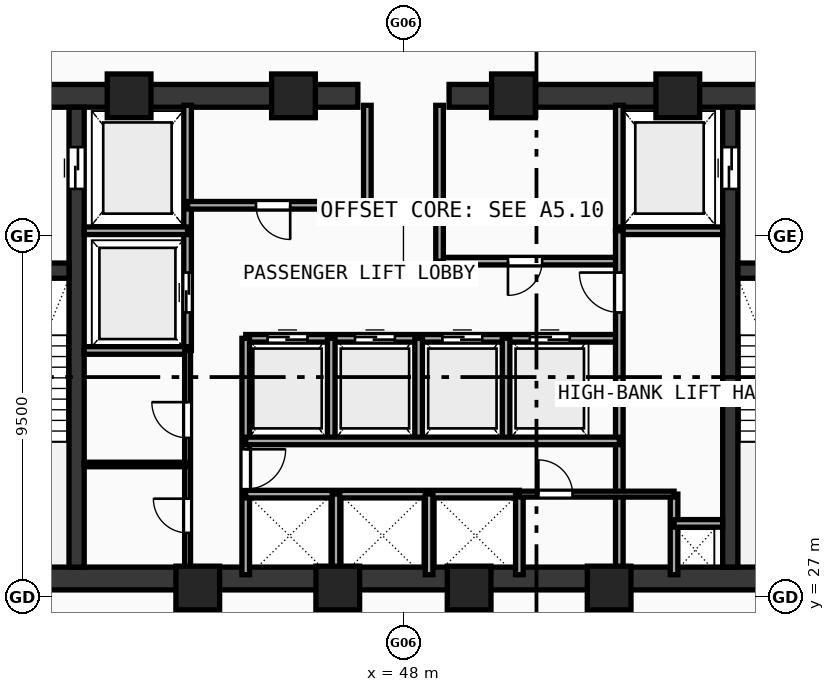
"""IFC4 building model, lengths in metres.
Left out: names, types, materials, properties, quantities, classifications, styles, units other than length and angle.
Written with IfcOpenShell. Run it as: python <this file> out.ifc"""

import sys

from ifc_helpers import new_model, si_unit, direction, frame, frame_2d, origin, origin_with_axes, origin_2d, place, context, subcontext, project, spatial, rectangle, hollow_rectangle, extrude, source, transform, mapped, element, fill, save


model = new_model("IFC4")
c1 = context("Model", 3, precision=1e-05, world=origin(), true_north=direction((0.0, 1.0)))
c2 = subcontext(c1, "Body", "Model", "MODEL_VIEW")
j1 = project(units=[si_unit("LENGTHUNIT", "METRE"), si_unit("PLANEANGLEUNIT", "RADIAN")], contexts=[c1])
p1 = place(None, origin())
s1 = spatial("IfcSite", under=j1, at=p1, CompositionType="ELEMENT")
p2 = place(p1, origin())
s2 = spatial("IfcBuilding", under=s1, at=p2, CompositionType="ELEMENT")
p3 = place(p2, frame((0.0, 0.0, 133.51)))
s3 = spatial("IfcBuildingStorey", under=s2, at=p3, CompositionType="ELEMENT", Elevation=133.51)
p4 = place(p3, frame((35.5, 27.5, 0.0), z_axis=(0.0, 0.0, 1.0), x_axis=(1.0, 0.0, 0.0)))
e1 = element("IfcWall", 1, at=p4, inside=s3, PredefinedType="SHEAR", context=c2, shape_type="SweptSolid", body=[
    extrude(rectangle(XDim=25.0, YDim=0.6, at=frame_2d((12.5, 0.0))), origin(), (0.0, 0.0, 1.0), 3.42),
])
p5 = place(p3, frame((35.5, 40.2, 0.0), z_axis=(0.0, 0.0, 1.0), x_axis=(1.0, 0.0, 0.0)))
e2 = element("IfcWall", 2, at=p5, inside=s3, PredefinedType="SHEAR", context=c2, shape_type="SweptSolid", body=[
    extrude(rectangle(XDim=11.3, YDim=0.6, at=frame_2d((5.65, 0.0))), origin(), (0.0, 0.0, 1.0), 3.42),
])
p6 = place(p5, frame((1.65, 0.0, 0.0)))
e3 = element("IfcOpeningElement", 3, at=p6, cuts=e2, PredefinedType="OPENING", context=c2, shape_type="SweptSolid", body=[
    extrude(rectangle(XDim=1.05, YDim=2.1, at=frame_2d((0.525, 1.05))), frame((0.0, 0.31, 0.0), z_axis=(0.0, -1.0, 0.0), x_axis=(1.0, 0.0, 0.0)), (0.0, 0.0, 1.0), 0.62),
])
p7 = place(p3, frame((49.2, 40.2, 0.0), z_axis=(0.0, 0.0, 1.0), x_axis=(1.0, 0.0, 0.0)))
e4 = element("IfcWall", 4, at=p7, inside=s3, PredefinedType="SHEAR", context=c2, shape_type="SweptSolid", body=[
    extrude(rectangle(XDim=11.3, YDim=0.6, at=frame_2d((5.65, 0.0))), origin(), (0.0, 0.0, 1.0), 3.42),
])
p8 = place(p7, frame((8.6, 0.0, 0.0)))
e5 = element("IfcOpeningElement", 5, at=p8, cuts=e4, PredefinedType="OPENING", context=c2, shape_type="SweptSolid", body=[
    extrude(rectangle(XDim=1.05, YDim=2.1, at=frame_2d((0.525, 1.05))), frame((0.0, 0.31, 0.0), z_axis=(0.0, -1.0, 0.0), x_axis=(1.0, 0.0, 0.0)), (0.0, 0.0, 1.0), 0.62),
])
p9 = place(p3, frame((39.4, 27.8, 0.0), z_axis=(0.0, 0.0, 1.0), x_axis=(0.0, 1.0, 0.0)))
e6 = element("IfcWall", 6, at=p9, inside=s3, PredefinedType="SHEAR", context=c2, shape_type="SweptSolid", body=[
    extrude(rectangle(XDim=12.1, YDim=0.4, at=frame_2d((6.05, 0.0))), origin(), (0.0, 0.0, 1.0), 3.42),
])
p10 = place(p9, frame((9.95, 0.0, 0.0)))
e7 = element("IfcOpeningElement", 7, at=p10, cuts=e6, PredefinedType="OPENING", context=c2, shape_type="SweptSolid", body=[
    extrude(rectangle(XDim=1.1, YDim=2.1, at=frame_2d((0.55, 1.05))), frame((0.0, 0.21, 0.0), z_axis=(0.0, -1.0, 0.0), x_axis=(1.0, 0.0, 0.0)), (0.0, 0.0, 1.0), 0.42),
])
p11 = place(p3, frame((56.6, 27.8, 0.0), z_axis=(0.0, 0.0, 1.0), x_axis=(0.0, 1.0, 0.0)))
e8 = element("IfcWall", 8, at=p11, inside=s3, PredefinedType="SHEAR", context=c2, shape_type="SweptSolid", body=[
    extrude(rectangle(XDim=12.1, YDim=0.4, at=frame_2d((6.05, 0.0))), origin(), (0.0, 0.0, 1.0), 3.42),
])
p12 = place(p11, frame((9.95, 0.0, 0.0)))
e9 = element("IfcOpeningElement", 9, at=p12, cuts=e8, PredefinedType="OPENING", context=c2, shape_type="SweptSolid", body=[
    extrude(rectangle(XDim=1.1, YDim=2.1, at=frame_2d((0.55, 1.05))), frame((0.0, 0.21, 0.0), z_axis=(0.0, -1.0, 0.0), x_axis=(1.0, 0.0, 0.0)), (0.0, 0.0, 1.0), 0.42),
])
p13 = place(p3, frame((36.1, 35.6, 0.0), z_axis=(0.0, 0.0, 1.0), x_axis=(1.0, 0.0, 0.0)))
e10 = element("IfcWall", 10, at=p13, inside=s3, PredefinedType="SHEAR", context=c2, shape_type="SweptSolid", body=[
    extrude(rectangle(XDim=3.1, YDim=0.4, at=frame_2d((1.55, 0.0))), origin(), (0.0, 0.0, 1.0), 3.42),
])
p14 = place(p13, frame((1.02, 0.0, 0.0)))
e11 = element("IfcOpeningElement", 11, at=p14, cuts=e10, PredefinedType="OPENING", context=c2, shape_type="SweptSolid", body=[
    extrude(rectangle(XDim=1.05, YDim=2.1, at=frame_2d((0.525, 1.05))), frame((0.0, 0.21, 0.0), z_axis=(0.0, -1.0, 0.0), x_axis=(1.0, 0.0, 0.0)), (0.0, 0.0, 1.0), 0.42),
])
p15 = place(p3, frame((56.8, 35.6, 0.0), z_axis=(0.0, 0.0, 1.0), x_axis=(1.0, 0.0, 0.0)))
e12 = element("IfcWall", 12, at=p15, inside=s3, PredefinedType="SHEAR", context=c2, shape_type="SweptSolid", body=[
    extrude(rectangle(XDim=3.1, YDim=0.4, at=frame_2d((1.55, 0.0))), origin(), (0.0, 0.0, 1.0), 3.42),
])
p16 = place(p15, frame((1.02, 0.0, 0.0)))
e13 = element("IfcOpeningElement", 13, at=p16, cuts=e12, PredefinedType="OPENING", context=c2, shape_type="SweptSolid", body=[
    extrude(rectangle(XDim=1.05, YDim=2.1, at=frame_2d((0.525, 1.05))), frame((0.0, 0.21, 0.0), z_axis=(0.0, -1.0, 0.0), x_axis=(1.0, 0.0, 0.0)), (0.0, 0.0, 1.0), 0.42),
])
m1 = source(origin(), c2, "Body", "SweptSolid", [
    extrude(hollow_rectangle(XDim=1.15, YDim=1.15, WallThickness=0.048, at=origin_2d()), origin(), (0.0, 0.0, 1.0), 3.68),
])
for number, where, z_axis, x_axis in (
    (14, (42.588, 27.25, -0.26), (0.0, 0.0, 1.0), (1.0, 0.0, 0.0)),
    (15, (46.272, 27.25, -0.26), (0.0, 0.0, 1.0), (1.0, 0.0, 0.0)),
    (16, (49.729, 27.25, -0.26), (0.0, 0.0, 1.0), (1.0, 0.0, 0.0)),
    (17, (53.412, 27.25, -0.26), (0.0, 0.0, 1.0), (1.0, 0.0, 0.0)),
    (18, (55.219, 40.2, -0.26), (0.0, 0.0, 1.0), (1.0, 0.0, 0.0)),
    (19, (50.894, 40.2, -0.26), (0.0, 0.0, 1.0), (1.0, 0.0, 0.0)),
    (20, (45.106, 40.2, -0.26), (0.0, 0.0, 1.0), (1.0, 0.0, 0.0)),
    (21, (40.781, 40.2, -0.26), (0.0, 0.0, 1.0), (1.0, 0.0, 0.0)),
):
    element("IfcColumn", number, at=place(p3, frame(where, z_axis=z_axis, x_axis=x_axis)), inside=s3, PredefinedType="COLUMN", context=c2, shape_type="MappedRepresentation", body=[
        mapped(m1, transform((0.0, 0.0, 0.0), scale=1.0)),
    ])
p17 = place(p3, frame((42.32, 33.5, 0.0), z_axis=(0.0, 0.0, 1.0), x_axis=(0.0, 1.0, 0.0)))
e22 = element("IfcWall", 22, at=p17, inside=s3, PredefinedType="SOLIDWALL", context=c2, shape_type="SweptSolid", body=[
    extrude(rectangle(XDim=6.45, YDim=0.2, at=frame_2d((3.225, 0.0))), origin(), (0.0, 0.0, 1.0), 3.42),
])
p18 = place(p17, frame((1.0, 0.0, 0.0)))
e23 = element("IfcOpeningElement", 23, at=p18, cuts=e22, PredefinedType="OPENING", context=c2, shape_type="SweptSolid", body=[
    extrude(rectangle(XDim=1.05, YDim=2.1, at=frame_2d((0.525, 1.05))), frame((0.0, 0.11, 0.0), z_axis=(0.0, -1.0, 0.0), x_axis=(1.0, 0.0, 0.0)), (0.0, 0.0, 1.0), 0.22),
])
for number, where, z_axis, x_axis in (
    (24, (39.6, 36.65, 0.0), (0.0, 0.0, 1.0), (1.0, 0.0, 0.0)),
    (25, (39.6, 33.5, 0.0), (0.0, 0.0, 1.0), (1.0, 0.0, 0.0)),
):
    element("IfcWall", number, at=place(p3, frame(where, z_axis=z_axis, x_axis=x_axis)), inside=s3, PredefinedType="SOLIDWALL", context=c2, shape_type="SweptSolid", body=[
        extrude(rectangle(XDim=2.72, YDim=0.2, at=frame_2d((1.36, 0.0))), origin(), (0.0, 0.0, 1.0), 3.42),
    ])
p19 = place(p3, frame((53.68, 36.65, 0.0), z_axis=(0.0, 0.0, 1.0), x_axis=(0.0, 1.0, 0.0)))
e26 = element("IfcWall", 26, at=p19, inside=s3, PredefinedType="SOLIDWALL", context=c2, shape_type="SweptSolid", body=[
    extrude(rectangle(XDim=3.3, YDim=0.2, at=frame_2d((1.65, 0.0))), origin(), (0.0, 0.0, 1.0), 3.42),
])
p20 = place(p3, frame((53.68, 36.65, 0.0), z_axis=(0.0, 0.0, 1.0), x_axis=(1.0, 0.0, 0.0)))
e27 = element("IfcWall", 27, at=p20, inside=s3, PredefinedType="SOLIDWALL", context=c2, shape_type="SweptSolid", body=[
    extrude(rectangle(XDim=2.72, YDim=0.2, at=frame_2d((1.36, 0.0))), origin(), (0.0, 0.0, 1.0), 3.42),
])
p21 = place(p3, frame((42.32, 37.32, 0.0), z_axis=(0.0, 0.0, 1.0), x_axis=(1.0, 0.0, 0.0)))
e28 = element("IfcWall", 28, at=p21, inside=s3, PredefinedType="SOLIDWALL", context=c2, shape_type="SweptSolid", body=[
    extrude(rectangle(XDim=4.73, YDim=0.2, at=frame_2d((2.365, 0.0))), origin(), (0.0, 0.0, 1.0), 3.42),
])
p22 = place(p21, frame((1.8, 0.0, 0.0)))
e29 = element("IfcOpeningElement", 29, at=p22, cuts=e28, PredefinedType="OPENING", context=c2, shape_type="SweptSolid", body=[
    extrude(rectangle(XDim=0.9, YDim=2.1, at=frame_2d((0.45, 1.05))), frame((0.0, 0.11, 0.0), z_axis=(0.0, -1.0, 0.0), x_axis=(1.0, 0.0, 0.0)), (0.0, 0.0, 1.0), 0.22),
])
p23 = place(p3, frame((48.95, 35.85, 0.0), z_axis=(0.0, 0.0, 1.0), x_axis=(1.0, 0.0, 0.0)))
e30 = element("IfcWall", 30, at=p23, inside=s3, PredefinedType="SOLIDWALL", context=c2, shape_type="SweptSolid", body=[
    extrude(rectangle(XDim=4.73, YDim=0.2, at=frame_2d((2.365, 0.0))), origin(), (0.0, 0.0, 1.0), 3.42),
])
p24 = place(p23, frame((1.8, 0.0, 0.0)))
e31 = element("IfcOpeningElement", 31, at=p24, cuts=e30, PredefinedType="OPENING", context=c2, shape_type="SweptSolid", body=[
    extrude(rectangle(XDim=0.9, YDim=2.1, at=frame_2d((0.45, 1.05))), frame((0.0, 0.11, 0.0), z_axis=(0.0, -1.0, 0.0), x_axis=(1.0, 0.0, 0.0)), (0.0, 0.0, 1.0), 0.22),
])
p25 = place(p3, frame((47.05, 37.32, 0.0), z_axis=(0.0, 0.0, 1.0), x_axis=(0.0, 1.0, 0.0)))
e32 = element("IfcWall", 32, at=p25, inside=s3, PredefinedType="SOLIDWALL", context=c2, shape_type="SweptSolid", body=[
    extrude(rectangle(XDim=2.63, YDim=0.2, at=frame_2d((1.315, 0.0))), origin(), (0.0, 0.0, 1.0), 3.42),
])
p26 = place(p3, frame((48.95, 35.85, 0.0), z_axis=(0.0, 0.0, 1.0), x_axis=(0.0, 1.0, 0.0)))
e33 = element("IfcWall", 33, at=p26, inside=s3, PredefinedType="SOLIDWALL", context=c2, shape_type="SweptSolid", body=[
    extrude(rectangle(XDim=4.1, YDim=0.2, at=frame_2d((2.05, 0.0))), origin(), (0.0, 0.0, 1.0), 3.42),
])
p27 = place(p3, frame((43.85, 33.82, 0.0), z_axis=(0.0, 0.0, 1.0), x_axis=(1.0, 0.0, 0.0)))
e34 = element("IfcWall", 34, at=p27, inside=s3, PredefinedType="SOLIDWALL", context=c2, shape_type="SweptSolid", body=[
    extrude(rectangle(XDim=9.83, YDim=0.2, at=frame_2d((4.915, 0.0))), origin(), (0.0, 0.0, 1.0), 3.42),
])
p28 = place(p27, frame((0.575, 0.0, 0.0)))
e35 = element("IfcOpeningElement", 35, at=p28, cuts=e34, PredefinedType="OPENING", context=c2, shape_type="SweptSolid", body=[
    extrude(rectangle(XDim=1.05, YDim=2.1, at=frame_2d((0.525, 1.05))), frame((0.0, 0.11, 0.0), z_axis=(0.0, -1.0, 0.0), x_axis=(1.0, 0.0, 0.0)), (0.0, 0.0, 1.0), 0.22),
])
p29 = place(p27, frame((2.875, 0.0, 0.0)))
e36 = element("IfcOpeningElement", 36, at=p29, cuts=e34, PredefinedType="OPENING", context=c2, shape_type="SweptSolid", body=[
    extrude(rectangle(XDim=1.05, YDim=2.1, at=frame_2d((0.525, 1.05))), frame((0.0, 0.11, 0.0), z_axis=(0.0, -1.0, 0.0), x_axis=(1.0, 0.0, 0.0)), (0.0, 0.0, 1.0), 0.22),
])
p30 = place(p27, frame((5.175, 0.0, 0.0)))
e37 = element("IfcOpeningElement", 37, at=p30, cuts=e34, PredefinedType="OPENING", context=c2, shape_type="SweptSolid", body=[
    extrude(rectangle(XDim=1.05, YDim=2.1, at=frame_2d((0.525, 1.05))), frame((0.0, 0.11, 0.0), z_axis=(0.0, -1.0, 0.0), x_axis=(1.0, 0.0, 0.0)), (0.0, 0.0, 1.0), 0.22),
])
p31 = place(p27, frame((7.475, 0.0, 0.0)))
e38 = element("IfcOpeningElement", 38, at=p31, cuts=e34, PredefinedType="OPENING", context=c2, shape_type="SweptSolid", body=[
    extrude(rectangle(XDim=1.05, YDim=2.1, at=frame_2d((0.525, 1.05))), frame((0.0, 0.11, 0.0), z_axis=(0.0, -1.0, 0.0), x_axis=(1.0, 0.0, 0.0)), (0.0, 0.0, 1.0), 0.22),
])
p32 = place(p3, frame((43.85, 27.6, 0.0), z_axis=(0.0, 0.0, 1.0), x_axis=(0.0, 1.0, 0.0)))
e39 = element("IfcWall", 39, at=p32, inside=s3, PredefinedType="SOLIDWALL", context=c2, shape_type="SweptSolid", body=[
    extrude(rectangle(XDim=6.22, YDim=0.2, at=frame_2d((3.11, 0.0))), origin(), (0.0, 0.0, 1.0), 3.42),
])
p33 = place(p32, frame((2.25, 0.0, 0.0)))
e40 = element("IfcOpeningElement", 40, at=p33, cuts=e39, PredefinedType="OPENING", context=c2, shape_type="SweptSolid", body=[
    extrude(rectangle(XDim=1.05, YDim=2.1, at=frame_2d((0.525, 1.05))), frame((0.0, 0.11, 0.0), z_axis=(0.0, -1.0, 0.0), x_axis=(1.0, 0.0, 0.0)), (0.0, 0.0, 1.0), 0.22),
])
p34 = place(p3, frame((53.68, 27.6, 0.0), z_axis=(0.0, 0.0, 1.0), x_axis=(0.0, 1.0, 0.0)))
e41 = element("IfcWall", 41, at=p34, inside=s3, PredefinedType="SOLIDWALL", context=c2, shape_type="SweptSolid", body=[
    extrude(rectangle(XDim=9.05, YDim=0.2, at=frame_2d((4.525, 0.0))), origin(), (0.0, 0.0, 1.0), 3.42),
])
p35 = place(p34, frame((6.9, 0.0, 0.0)))
e42 = element("IfcOpeningElement", 42, at=p35, cuts=e41, PredefinedType="OPENING", context=c2, shape_type="SweptSolid", body=[
    extrude(rectangle(XDim=1.05, YDim=2.1, at=frame_2d((0.525, 1.05))), frame((0.0, 0.11, 0.0), z_axis=(0.0, -1.0, 0.0), x_axis=(1.0, 0.0, 0.0)), (0.0, 0.0, 1.0), 0.22),
])
for number, where, z_axis, x_axis in (
    (43, (46.1, 31.12, 0.0), (0.0, 0.0, 1.0), (0.0, 1.0, 0.0)),
    (44, (48.4, 31.12, 0.0), (0.0, 0.0, 1.0), (0.0, 1.0, 0.0)),
    (45, (50.7, 31.12, 0.0), (0.0, 0.0, 1.0), (0.0, 1.0, 0.0)),
):
    element("IfcWall", number, at=place(p3, frame(where, z_axis=z_axis, x_axis=x_axis)), inside=s3, PredefinedType="SOLIDWALL", context=c2, shape_type="SweptSolid", body=[
        extrude(rectangle(XDim=2.7, YDim=0.2, at=frame_2d((1.35, 0.0))), origin(), (0.0, 0.0, 1.0), 3.42),
    ])
p36 = place(p3, frame((43.85, 29.72, 0.0), z_axis=(0.0, 0.0, 1.0), x_axis=(1.0, 0.0, 0.0)))
e46 = element("IfcWall", 46, at=p36, inside=s3, PredefinedType="SOLIDWALL", context=c2, shape_type="SweptSolid", body=[
    extrude(rectangle(XDim=7.2, YDim=0.2, at=frame_2d((3.6, 0.0))), origin(), (0.0, 0.0, 1.0), 3.42),
])
p37 = place(p3, frame((51.05, 27.6, 0.0), z_axis=(0.0, 0.0, 1.0), x_axis=(0.0, 1.0, 0.0)))
e47 = element("IfcWall", 47, at=p37, inside=s3, PredefinedType="SOLIDWALL", context=c2, shape_type="SweptSolid", body=[
    extrude(rectangle(XDim=2.12, YDim=0.2, at=frame_2d((1.06, 0.0))), origin(), (0.0, 0.0, 1.0), 3.42),
])
p38 = place(p3, frame((43.85, 31.12, 0.0), z_axis=(0.0, 0.0, 1.0), x_axis=(1.0, 0.0, 0.0)))
e48 = element("IfcWall", 48, at=p38, inside=s3, PredefinedType="SOLIDWALL", context=c2, shape_type="SweptSolid", body=[
    extrude(rectangle(XDim=9.83, YDim=0.2, at=frame_2d((4.915, 0.0))), origin(), (0.0, 0.0, 1.0), 3.42),
])
for number, where, z_axis, x_axis in (
    (49, (46.225, 27.6, 0.0), (0.0, 0.0, 1.0), (0.0, 1.0, 0.0)),
    (50, (48.675, 27.6, 0.0), (0.0, 0.0, 1.0), (0.0, 1.0, 0.0)),
    (51, (55.12, 27.6, 0.0), (0.0, 0.0, 1.0), (0.0, 1.0, 0.0)),
):
    element("IfcWall", number, at=place(p3, frame(where, z_axis=z_axis, x_axis=x_axis)), inside=s3, PredefinedType="SOLIDWALL", context=c2, shape_type="SweptSolid", body=[
        extrude(rectangle(XDim=2.12, YDim=0.2, at=frame_2d((1.06, 0.0))), origin(), (0.0, 0.0, 1.0), 3.42),
    ])
p39 = place(p3, frame((55.12, 28.95, 0.0), z_axis=(0.0, 0.0, 1.0), x_axis=(1.0, 0.0, 0.0)))
e52 = element("IfcWall", 52, at=p39, inside=s3, PredefinedType="SOLIDWALL", context=c2, shape_type="SweptSolid", body=[
    extrude(rectangle(XDim=1.28, YDim=0.2, at=frame_2d((0.64, 0.0))), origin(), (0.0, 0.0, 1.0), 3.42),
])
p40 = place(p3, frame((42.32, 27.6, 0.0), z_axis=(0.0, 0.0, 1.0), x_axis=(0.0, 1.0, 0.0)))
e53 = element("IfcWall", 53, at=p40, inside=s3, PredefinedType="PARTITIONING", context=c2, shape_type="SweptSolid", body=[
    extrude(rectangle(XDim=5.9, YDim=0.155, at=frame_2d((2.95, 0.0))), origin(), (0.0, 0.0, 1.0), 3.42),
])
p41 = place(p40, frame((1.1, 0.0, 0.0)))
e54 = element("IfcOpeningElement", 54, at=p41, cuts=e53, PredefinedType="OPENING", context=c2, shape_type="SweptSolid", body=[
    extrude(rectangle(XDim=0.9, YDim=2.1, at=frame_2d((0.45, 1.05))), frame((0.0, 0.087, 0.0), z_axis=(0.0, -1.0, 0.0), x_axis=(1.0, 0.0, 0.0)), (0.0, 0.0, 1.0), 0.175),
])
p42 = place(p40, frame((3.6, 0.0, 0.0)))
e55 = element("IfcOpeningElement", 55, at=p42, cuts=e53, PredefinedType="OPENING", context=c2, shape_type="SweptSolid", body=[
    extrude(rectangle(XDim=0.94, YDim=2.1, at=frame_2d((0.47, 1.05))), frame((0.0, 0.087, 0.0), z_axis=(0.0, -1.0, 0.0), x_axis=(1.0, 0.0, 0.0)), (0.0, 0.0, 1.0), 0.175),
])
p43 = place(p3, frame((51.05, 29.72, 0.0), z_axis=(0.0, 0.0, 1.0), x_axis=(1.0, 0.0, 0.0)))
e56 = element("IfcWall", 56, at=p43, inside=s3, PredefinedType="PARTITIONING", context=c2, shape_type="SweptSolid", body=[
    extrude(rectangle(XDim=4.07, YDim=0.155, at=frame_2d((2.035, 0.0))), origin(), (0.0, 0.0, 1.0), 3.42),
])
p44 = place(p43, frame((0.5, 0.0, 0.0)))
e57 = element("IfcOpeningElement", 57, at=p44, cuts=e56, PredefinedType="OPENING", context=c2, shape_type="SweptSolid", body=[
    extrude(rectangle(XDim=0.9, YDim=2.1, at=frame_2d((0.45, 1.05))), frame((0.0, 0.087, 0.0), z_axis=(0.0, -1.0, 0.0), x_axis=(1.0, 0.0, 0.0)), (0.0, 0.0, 1.0), 0.175),
])
p45 = place(p3, frame((39.6, 30.5, 0.0), z_axis=(0.0, 0.0, 1.0), x_axis=(1.0, 0.0, 0.0)))
e58 = element("IfcWall", 58, at=p45, inside=s3, PredefinedType="PARTITIONING", context=c2, shape_type="SweptSolid", body=[
    extrude(rectangle(XDim=2.72, YDim=0.12, at=frame_2d((1.36, 0.0))), origin(), (0.0, 0.0, 1.0), 3.42),
])
m2 = source(origin(), c2, "Body", "SweptSolid", [
    extrude(rectangle(XDim=1.1, YDim=2.1, at=frame_2d((0.55, 1.05))), frame((0.0, 0.025, 0.0), z_axis=(0.0, -1.0, 0.0), x_axis=(1.0, 0.0, 0.0)), (0.0, 0.0, 1.0), 0.05),
])
p46 = place(p10, frame((1.1, 0.0, 0.0), z_axis=(0.0, 0.0, 1.0), x_axis=(-1.0, 0.0, 0.0)))
e59 = element("IfcDoor", 59, at=p46, inside=s3, OperationType="DOUBLE_DOOR_SLIDING", PredefinedType="DOOR", context=c2, shape_type="MappedRepresentation", body=[
    mapped(m2, transform((0.0, 0.0, 0.0), scale=1.0)),
])
fill(e7, e59)
p47 = place(p12, origin_with_axes())
e60 = element("IfcDoor", 60, at=p47, inside=s3, OperationType="DOUBLE_DOOR_SLIDING", PredefinedType="DOOR", context=c2, shape_type="MappedRepresentation", body=[
    mapped(m2, transform((0.0, 0.0, 0.0), scale=1.0)),
])
fill(e9, e60)
m3 = source(origin(), c2, "Body", "SweptSolid", [
    extrude(rectangle(XDim=1.05, YDim=2.1, at=frame_2d((0.525, 1.05))), frame((0.0, 0.025, 0.0), z_axis=(0.0, -1.0, 0.0), x_axis=(1.0, 0.0, 0.0)), (0.0, 0.0, 1.0), 0.05),
])
p48 = place(p18, origin_with_axes())
e61 = element("IfcDoor", 61, at=p48, inside=s3, OperationType="DOUBLE_DOOR_SLIDING", PredefinedType="DOOR", context=c2, shape_type="MappedRepresentation", body=[
    mapped(m3, transform((0.0, 0.0, 0.0), scale=1.0)),
])
fill(e23, e61)
m4 = source(origin(), c2, "Body", "SweptSolid", [
    extrude(rectangle(XDim=0.9, YDim=2.1, at=frame_2d((0.45, 1.05))), frame((0.0, 0.025, 0.0), z_axis=(0.0, -1.0, 0.0), x_axis=(1.0, 0.0, 0.0)), (0.0, 0.0, 1.0), 0.05),
])
p49 = place(p22, frame((0.9, 0.0, 0.0), z_axis=(0.0, 0.0, 1.0), x_axis=(-1.0, 0.0, 0.0)))
e62 = element("IfcDoor", 62, at=p49, inside=s3, OperationType="SINGLE_SWING_LEFT", PredefinedType="DOOR", context=c2, shape_type="MappedRepresentation", body=[
    mapped(m4, transform((0.0, 0.0, 0.0), scale=1.0)),
])
fill(e29, e62)
p50 = place(p24, frame((0.9, 0.0, 0.0), z_axis=(0.0, 0.0, 1.0), x_axis=(-1.0, 0.0, 0.0)))
e63 = element("IfcDoor", 63, at=p50, inside=s3, OperationType="SINGLE_SWING_RIGHT", PredefinedType="DOOR", context=c2, shape_type="MappedRepresentation", body=[
    mapped(m4, transform((0.0, 0.0, 0.0), scale=1.0)),
])
fill(e31, e63)
p51 = place(p28, origin_with_axes())
e64 = element("IfcDoor", 64, at=p51, inside=s3, OperationType="DOUBLE_DOOR_SLIDING", PredefinedType="DOOR", context=c2, shape_type="MappedRepresentation", body=[
    mapped(m3, transform((0.0, 0.0, 0.0), scale=1.0)),
])
fill(e35, e64)
p52 = place(p29, origin_with_axes())
e65 = element("IfcDoor", 65, at=p52, inside=s3, OperationType="DOUBLE_DOOR_SLIDING", PredefinedType="DOOR", context=c2, shape_type="MappedRepresentation", body=[
    mapped(m3, transform((0.0, 0.0, 0.0), scale=1.0)),
])
fill(e36, e65)
p53 = place(p30, origin_with_axes())
e66 = element("IfcDoor", 66, at=p53, inside=s3, OperationType="DOUBLE_DOOR_SLIDING", PredefinedType="DOOR", context=c2, shape_type="MappedRepresentation", body=[
    mapped(m3, transform((0.0, 0.0, 0.0), scale=1.0)),
])
fill(e37, e66)
p54 = place(p31, origin_with_axes())
e67 = element("IfcDoor", 67, at=p54, inside=s3, OperationType="DOUBLE_DOOR_SLIDING", PredefinedType="DOOR", context=c2, shape_type="MappedRepresentation", body=[
    mapped(m3, transform((0.0, 0.0, 0.0), scale=1.0)),
])
fill(e38, e67)
p55 = place(p33, frame((1.05, 0.0, 0.0), z_axis=(0.0, 0.0, 1.0), x_axis=(-1.0, 0.0, 0.0)))
e68 = element("IfcDoor", 68, at=p55, inside=s3, OperationType="SINGLE_SWING_LEFT", PredefinedType="DOOR", context=c2, shape_type="MappedRepresentation", body=[
    mapped(m3, transform((0.0, 0.0, 0.0), scale=1.0)),
])
fill(e40, e68)
p56 = place(p35, origin_with_axes())
e69 = element("IfcDoor", 69, at=p56, inside=s3, OperationType="SINGLE_SWING_RIGHT", PredefinedType="DOOR", context=c2, shape_type="MappedRepresentation", body=[
    mapped(m3, transform((0.0, 0.0, 0.0), scale=1.0)),
])
fill(e42, e69)
p57 = place(p41, origin_with_axes())
e70 = element("IfcDoor", 70, at=p57, inside=s3, OperationType="SINGLE_SWING_RIGHT", PredefinedType="DOOR", context=c2, shape_type="MappedRepresentation", body=[
    mapped(m4, transform((0.0, 0.0, 0.0), scale=1.0)),
])
fill(e54, e70)
m5 = source(origin(), c2, "Body", "SweptSolid", [
    extrude(rectangle(XDim=0.94, YDim=2.1, at=frame_2d((0.47, 1.05))), frame((0.0, 0.025, 0.0), z_axis=(0.0, -1.0, 0.0), x_axis=(1.0, 0.0, 0.0)), (0.0, 0.0, 1.0), 0.05),
])
p58 = place(p42, origin_with_axes())
e71 = element("IfcDoor", 71, at=p58, inside=s3, OperationType="SINGLE_SWING_RIGHT", PredefinedType="DOOR", context=c2, shape_type="MappedRepresentation", body=[
    mapped(m5, transform((0.0, 0.0, 0.0), scale=1.0)),
])
fill(e55, e71)
p59 = place(p44, origin_with_axes())
e72 = element("IfcDoor", 72, at=p59, inside=s3, OperationType="SINGLE_SWING_LEFT", PredefinedType="DOOR", context=c2, shape_type="MappedRepresentation", body=[
    mapped(m4, transform((0.0, 0.0, 0.0), scale=1.0)),
])
fill(e57, e72)
save(model, sys.argv[1])
